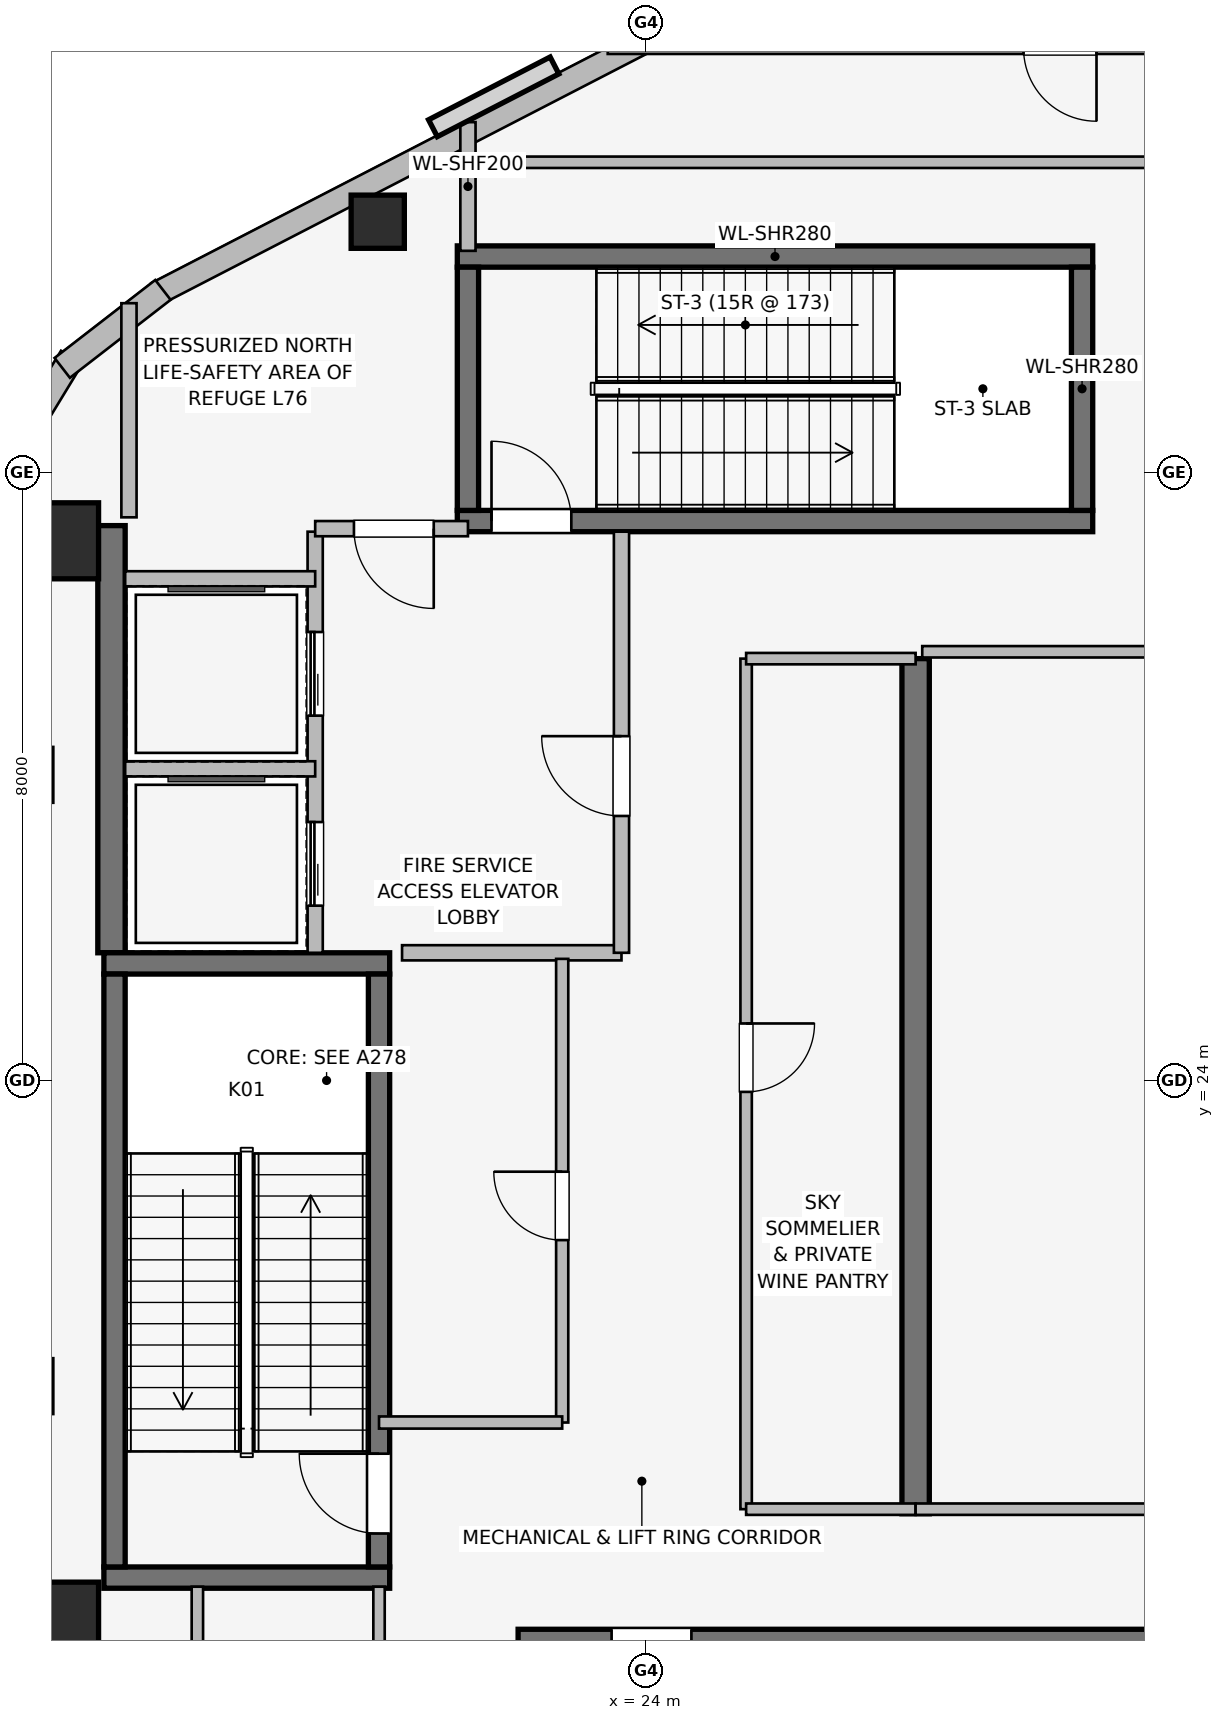
"""IFC4 building model, lengths in metres.
Left out: names, types, materials, properties, quantities, classifications, styles, units other than length and angle.
Written with IfcOpenShell. Run it as: python <this file> out.ifc"""

import sys

from ifc_helpers import new_model, si_unit, direction, frame, frame_2d, origin, origin_2d, place, context, subcontext, project, spatial, rectangle, extrude, element, fill, save


model = new_model("IFC4")
c1 = context("Model", 3, precision=1e-05, world=origin(), true_north=direction((0.0, 1.0)))
c2 = subcontext(c1, "Body", "Model", "MODEL_VIEW")
j1 = project(units=[si_unit("LENGTHUNIT", "METRE"), si_unit("PLANEANGLEUNIT", "RADIAN")], contexts=[c1])
p1 = place(None, origin())
s1 = spatial("IfcSite", under=j1, at=p1, CompositionType="ELEMENT")
p2 = place(p1, origin())
s2 = spatial("IfcBuilding", under=s1, at=p2, CompositionType="ELEMENT")
p3 = place(p2, frame((0.0, 0.0, 279.9)))
s3 = spatial("IfcBuildingStorey", under=s2, at=p3, CompositionType="ELEMENT", Elevation=279.9)
p4 = place(p3, frame((16.97, 25.68, 0.0), z_axis=(0.0, 0.0, 1.0), x_axis=(0.0, 1.0, 0.0)))
e1 = element("IfcWall", 1, at=p4, inside=s3, PredefinedType="SHEAR", context=c2, shape_type="SweptSolid", body=[
    extrude(rectangle(XDim=5.62, YDim=0.36, at=frame_2d((2.81, 0.0))), origin(), (0.0, 0.0, 1.0), 5.2),
])
p5 = place(p3, frame((27.55, 29.55, 0.0), z_axis=(0.0, 0.0, 1.0), x_axis=(0.0, -1.0, 0.0)))
e2 = element("IfcWall", 2, at=p5, inside=s3, PredefinedType="SHEAR", context=c2, shape_type="SweptSolid", body=[
    extrude(rectangle(XDim=11.25, YDim=0.36, at=frame_2d((5.625, 0.0))), origin(), (0.0, 0.0, 1.0), 5.2),
])
for number, where, z_axis, x_axis in (
    (3, (16.87, 17.46, 0.0), (0.0, 0.0, 1.0), (1.0, 0.0, 0.0)),
    (4, (20.63, 25.54, 0.0), (0.0, 0.0, 1.0), (-1.0, 0.0, 0.0)),
):
    element("IfcWall", number, at=place(p3, frame(where, z_axis=z_axis, x_axis=x_axis)), inside=s3, PredefinedType="SHEAR", context=c2, shape_type="SweptSolid", body=[
        extrude(rectangle(XDim=3.76, YDim=0.28, at=frame_2d((1.88, 0.0))), origin(), (0.0, 0.0, 1.0), 5.2),
    ])
p6 = place(p3, frame((17.01, 25.4, 0.0), z_axis=(0.0, 0.0, 1.0), x_axis=(0.0, -1.0, 0.0)))
e5 = element("IfcWall", 5, at=p6, inside=s3, PredefinedType="SHEAR", context=c2, shape_type="SweptSolid", body=[
    extrude(rectangle(XDim=7.8, YDim=0.28, at=frame_2d((3.9, 0.0))), origin(), (0.0, 0.0, 1.0), 5.2),
])
p7 = place(p3, frame((20.49, 17.6, 0.0), z_axis=(0.0, 0.0, 1.0), x_axis=(0.0, 1.0, 0.0)))
e6 = element("IfcWall", 6, at=p7, inside=s3, PredefinedType="SHEAR", context=c2, shape_type="SweptSolid", body=[
    extrude(rectangle(XDim=7.8, YDim=0.28, at=frame_2d((3.9, 0.0))), origin(), (0.0, 0.0, 1.0), 5.2),
])
p8 = place(p7, frame((0.44, 0.0, 0.0)))
e7 = element("IfcOpeningElement", 7, at=p8, cuts=e6, PredefinedType="OPENING", context=c2, shape_type="SweptSolid", body=[
    extrude(rectangle(XDim=1.05, YDim=2.0, at=frame_2d((0.525, 1.0))), frame((0.0, 0.15, 0.0), z_axis=(0.0, -1.0, 0.0), x_axis=(1.0, 0.0, 0.0)), (0.0, 0.0, 1.0), 0.3),
])
p9 = place(p3, frame((30.68, 16.64, 0.0), z_axis=(0.0, 0.0, 1.0), x_axis=(-1.0, 0.0, 0.0)))
e8 = element("IfcWall", 8, at=p9, inside=s3, PredefinedType="SHEAR", context=c2, shape_type="SweptSolid", body=[
    extrude(rectangle(XDim=8.36, YDim=0.28, at=frame_2d((4.18, 0.0))), origin(), (0.0, 0.0, 1.0), 5.2),
])
p10 = place(p9, frame((6.08, 0.0, 0.0)))
e9 = element("IfcOpeningElement", 9, at=p10, cuts=e8, PredefinedType="OPENING", context=c2, shape_type="SweptSolid", body=[
    extrude(rectangle(XDim=1.05, YDim=2.0, at=frame_2d((0.525, 1.0))), frame((0.0, 0.15, 0.0), z_axis=(0.0, -1.0, 0.0), x_axis=(1.0, 0.0, 0.0)), (0.0, 0.0, 1.0), 0.3),
])
p11 = place(p3, frame((21.52, 31.36, 0.0), z_axis=(0.0, 0.0, 1.0), x_axis=(1.0, 0.0, 0.0)))
e10 = element("IfcWall", 10, at=p11, inside=s3, PredefinedType="SHEAR", context=c2, shape_type="SweptSolid", body=[
    extrude(rectangle(XDim=8.36, YDim=0.28, at=frame_2d((4.18, 0.0))), origin(), (0.0, 0.0, 1.0), 5.2),
])
p12 = place(p11, frame((0.45, 0.0, 0.0)))
e11 = element("IfcOpeningElement", 11, at=p12, cuts=e10, PredefinedType="OPENING", context=c2, shape_type="SweptSolid", body=[
    extrude(rectangle(XDim=1.05, YDim=2.0, at=frame_2d((0.525, 1.0))), frame((0.0, 0.15, 0.0), z_axis=(0.0, -1.0, 0.0), x_axis=(1.0, 0.0, 0.0)), (0.0, 0.0, 1.0), 0.3),
])
p13 = place(p3, frame((29.88, 34.84, 0.0), z_axis=(0.0, 0.0, 1.0), x_axis=(-1.0, 0.0, 0.0)))
e12 = element("IfcWall", 12, at=p13, inside=s3, PredefinedType="SHEAR", context=c2, shape_type="SweptSolid", body=[
    extrude(rectangle(XDim=8.36, YDim=0.28, at=frame_2d((4.18, 0.0))), origin(), (0.0, 0.0, 1.0), 5.2),
])
for number, where, z_axis, x_axis in (
    (13, (21.66, 34.7, 0.0), (0.0, 0.0, 1.0), (0.0, -1.0, 0.0)),
    (14, (29.74, 31.5, 0.0), (0.0, 0.0, 1.0), (0.0, 1.0, 0.0)),
):
    element("IfcWall", number, at=place(p3, frame(where, z_axis=z_axis, x_axis=x_axis)), inside=s3, PredefinedType="SHEAR", context=c2, shape_type="SweptSolid", body=[
        extrude(rectangle(XDim=3.2, YDim=0.28, at=frame_2d((1.6, 0.0))), origin(), (0.0, 0.0, 1.0), 5.2),
    ])
for number, where, z_axis, x_axis in (
    (15, (16.3, 16.9, 0.0), (0.0, 0.0, 1.0), (1.0, 0.0, 0.0)),
    (16, (16.3, 31.1, 0.0), (0.0, 0.0, 1.0), (1.0, 0.0, 0.0)),
):
    element("IfcColumn", number, at=place(p3, frame(where, z_axis=z_axis, x_axis=x_axis)), inside=s3, PredefinedType="COLUMN", context=c2, shape_type="SweptSolid", body=[
        extrude(rectangle(XDim=1.0, YDim=1.0, at=origin_2d()), origin(), (0.0, 0.0, 1.0), 5.2),
    ])
p14 = place(p3, frame((20.473, 35.298, 0.0), z_axis=(0.0, 0.0, 1.0), x_axis=(1.0, 0.0, 0.0)))
e17 = element("IfcColumn", 17, at=p14, inside=s3, PredefinedType="COLUMN", context=c2, shape_type="SweptSolid", body=[
    extrude(rectangle(XDim=0.7, YDim=0.7, at=origin_2d()), origin(), (0.0, 0.0, 1.0), 5.2),
])
p15 = place(p3, frame((17.566, 34.354, 0.0), z_axis=(0.0, 0.0, 1.0), x_axis=(0.888581481622, 0.458718814218, 0.0)))
e18 = element("IfcWall", 18, at=p15, inside=s3, PredefinedType="STANDARD", context=c2, shape_type="SweptSolid", body=[
    extrude(rectangle(XDim=15.077, YDim=0.31, at=frame_2d((7.539, 0.0))), origin(), (0.0, 0.0, 1.0), 4.89),
])
p16 = place(p3, frame((15.574, 32.082, 0.0), z_axis=(0.0, 0.0, 1.0), x_axis=(0.520325409202, 0.853968072318, 0.0)))
e19 = element("IfcWall", 19, at=p16, inside=s3, PredefinedType="STANDARD", context=c2, shape_type="SweptSolid", body=[
    extrude(rectangle(XDim=1.678, YDim=0.33, at=frame_2d((0.839, 0.0))), origin(), (0.0, 0.0, 1.0), 4.89),
])
p17 = place(p3, frame((16.322, 33.375, 0.0), z_axis=(0.0, 0.0, 1.0), x_axis=(0.790691856293, 0.61221433207, 0.0)))
e20 = element("IfcWall", 20, at=p17, inside=s3, PredefinedType="STANDARD", context=c2, shape_type="SweptSolid", body=[
    extrude(rectangle(XDim=1.676, YDim=0.33, at=frame_2d((0.838, 0.0))), origin(), (0.0, 0.0, 1.0), 4.89),
])
p18 = place(p3, frame((19.65, 25.68, 0.0), z_axis=(0.0, 0.0, 1.0), x_axis=(0.0, 1.0, 0.0)))
e21 = element("IfcWall", 21, at=p18, inside=s3, PredefinedType="PARTITIONING", context=c2, shape_type="SweptSolid", body=[
    extrude(rectangle(XDim=5.54, YDim=0.2, at=frame_2d((2.77, 0.0))), origin(), (0.0, 0.0, 1.0), 4.89),
])
p19 = place(p18, frame((0.62, 0.0, 0.0)))
e22 = element("IfcOpeningElement", 22, at=p19, cuts=e21, PredefinedType="OPENING", context=c2, shape_type="SweptSolid", body=[
    extrude(rectangle(XDim=1.1, YDim=2.2, at=frame_2d((0.55, 1.1))), frame((0.0, 0.11, 0.0), z_axis=(0.0, -1.0, 0.0), x_axis=(1.0, 0.0, 0.0)), (0.0, 0.0, 1.0), 0.22),
])
p20 = place(p18, frame((3.12, 0.0, 0.0)))
e23 = element("IfcOpeningElement", 23, at=p20, cuts=e21, PredefinedType="OPENING", context=c2, shape_type="SweptSolid", body=[
    extrude(rectangle(XDim=1.1, YDim=2.2, at=frame_2d((0.55, 1.1))), frame((0.0, 0.11, 0.0), z_axis=(0.0, -1.0, 0.0), x_axis=(1.0, 0.0, 0.0)), (0.0, 0.0, 1.0), 0.22),
])
p21 = place(p3, frame((20.793, 25.68, 0.0), z_axis=(0.0, 0.0, 1.0), x_axis=(1.0, 0.0, 0.0)))
e24 = element("IfcWall", 24, at=p21, inside=s3, PredefinedType="PARTITIONING", context=c2, shape_type="SweptSolid", body=[
    extrude(rectangle(XDim=2.887, YDim=0.2, at=frame_2d((1.443, 0.0))), origin(), (0.0, 0.0, 1.0), 4.89),
])
p22 = place(p3, frame((23.68, 25.68, 0.0), z_axis=(0.0, 0.0, 1.0), x_axis=(0.0, 1.0, 0.0)))
e25 = element("IfcWall", 25, at=p22, inside=s3, PredefinedType="PARTITIONING", context=c2, shape_type="SweptSolid", body=[
    extrude(rectangle(XDim=5.54, YDim=0.2, at=frame_2d((2.77, 0.0))), origin(), (0.0, 0.0, 1.0), 4.89),
])
p23 = place(p22, frame((1.8, 0.0, 0.0)))
e26 = element("IfcOpeningElement", 26, at=p23, cuts=e25, PredefinedType="OPENING", context=c2, shape_type="SweptSolid", body=[
    extrude(rectangle(XDim=1.05, YDim=2.0, at=frame_2d((0.525, 1.0))), frame((0.0, 0.11, 0.0), z_axis=(0.0, -1.0, 0.0), x_axis=(1.0, 0.0, 0.0)), (0.0, 0.0, 1.0), 0.22),
])
p24 = place(p3, frame((21.66, 31.26, 0.0), z_axis=(0.0, 0.0, 1.0), x_axis=(-1.0, 0.0, 0.0)))
e27 = element("IfcWall", 27, at=p24, inside=s3, PredefinedType="PARTITIONING", context=c2, shape_type="SweptSolid", body=[
    extrude(rectangle(XDim=2.01, YDim=0.2, at=frame_2d((1.005, 0.0))), origin(), (0.0, 0.0, 1.0), 4.89),
])
p25 = place(p24, frame((0.45, 0.0, 0.0)))
e28 = element("IfcOpeningElement", 28, at=p25, cuts=e27, PredefinedType="OPENING", context=c2, shape_type="SweptSolid", body=[
    extrude(rectangle(XDim=1.05, YDim=2.0, at=frame_2d((0.525, 1.0))), frame((0.0, 0.11, 0.0), z_axis=(0.0, -1.0, 0.0), x_axis=(1.0, 0.0, 0.0)), (0.0, 0.0, 1.0), 0.22),
])
p26 = place(p3, frame((17.15, 28.1, 0.0), z_axis=(0.0, 0.0, 1.0), x_axis=(1.0, 0.0, 0.0)))
e29 = element("IfcWall", 29, at=p26, inside=s3, PredefinedType="PARTITIONING", context=c2, shape_type="SweptSolid", body=[
    extrude(rectangle(XDim=2.5, YDim=0.2, at=frame_2d((1.25, 0.0))), origin(), (0.0, 0.0, 1.0), 4.89),
])
p27 = place(p3, frame((19.65, 30.6, 0.0), z_axis=(0.0, 0.0, 1.0), x_axis=(-1.0, 0.0, 0.0)))
e30 = element("IfcWall", 30, at=p27, inside=s3, PredefinedType="PARTITIONING", context=c2, shape_type="SweptSolid", body=[
    extrude(rectangle(XDim=2.5, YDim=0.2, at=frame_2d((1.25, 0.0))), origin(), (0.0, 0.0, 1.0), 3.79),
])
p28 = place(p3, frame((22.9, 19.5, 0.0), z_axis=(0.0, 0.0, 1.0), x_axis=(0.0, 1.0, 0.0)))
e31 = element("IfcWall", 31, at=p28, inside=s3, PredefinedType="PARTITIONING", context=c2, shape_type="SweptSolid", body=[
    extrude(rectangle(XDim=6.1, YDim=0.16, at=frame_2d((3.05, 0.0))), origin(), (0.0, 0.0, 1.0), 4.89),
])
p29 = place(p28, frame((2.4, 0.0, 0.0)))
e32 = element("IfcOpeningElement", 32, at=p29, cuts=e31, PredefinedType="OPENING", context=c2, shape_type="SweptSolid", body=[
    extrude(rectangle(XDim=0.9, YDim=2.0, at=frame_2d((0.45, 1.0))), frame((0.0, 0.09, 0.0), z_axis=(0.0, -1.0, 0.0), x_axis=(1.0, 0.0, 0.0)), (0.0, 0.0, 1.0), 0.18),
])
p30 = place(p3, frame((20.49, 19.5, 0.0), z_axis=(0.0, 0.0, 1.0), x_axis=(1.0, 0.0, 0.0)))
e33 = element("IfcWall", 33, at=p30, inside=s3, PredefinedType="PARTITIONING", context=c2, shape_type="SweptSolid", body=[
    extrude(rectangle(XDim=2.41, YDim=0.16, at=frame_2d((1.205, 0.0))), origin(), (0.0, 0.0, 1.0), 3.79),
])
p31 = place(p3, frame((25.32, 29.55, 0.0), z_axis=(0.0, 0.0, 1.0), x_axis=(0.0, -1.0, 0.0)))
e34 = element("IfcWall", 34, at=p31, inside=s3, PredefinedType="PARTITIONING", context=c2, shape_type="SweptSolid", body=[
    extrude(rectangle(XDim=11.19, YDim=0.15, at=frame_2d((5.595, 0.0))), origin(), (0.0, 0.0, 1.0), 4.89),
])
p32 = place(p31, frame((4.8, 0.0, 0.0)))
e35 = element("IfcOpeningElement", 35, at=p32, cuts=e34, PredefinedType="OPENING", context=c2, shape_type="SweptSolid", body=[
    extrude(rectangle(XDim=0.9, YDim=2.0, at=frame_2d((0.45, 1.0))), frame((0.0, 0.085, 0.0), z_axis=(0.0, -1.0, 0.0), x_axis=(1.0, 0.0, 0.0)), (0.0, 0.0, 1.0), 0.17),
])
p33 = place(p3, frame((25.32, 18.36, 0.0), z_axis=(0.0, 0.0, 1.0), x_axis=(1.0, 0.0, 0.0)))
e36 = element("IfcWall", 36, at=p33, inside=s3, PredefinedType="PARTITIONING", context=c2, shape_type="SweptSolid", body=[
    extrude(rectangle(XDim=2.23, YDim=0.15, at=frame_2d((1.115, 0.0))), origin(), (0.0, 0.0, 1.0), 4.89),
])
p34 = place(p3, frame((27.55, 29.55, 0.0), z_axis=(0.0, 0.0, 1.0), x_axis=(-1.0, 0.0, 0.0)))
e37 = element("IfcWall", 37, at=p34, inside=s3, PredefinedType="PARTITIONING", context=c2, shape_type="SweptSolid", body=[
    extrude(rectangle(XDim=2.23, YDim=0.15, at=frame_2d((1.115, 0.0))), origin(), (0.0, 0.0, 1.0), 3.79),
])
p35 = place(p3, frame((18.1, 17.34, 0.0), z_axis=(0.0, 0.0, 1.0), x_axis=(0.0, -1.0, 0.0)))
e38 = element("IfcWall", 38, at=p35, inside=s3, PredefinedType="PARTITIONING", context=c2, shape_type="SweptSolid", body=[
    extrude(rectangle(XDim=4.133, YDim=0.15, at=frame_2d((2.066, 0.0))), origin(), (0.0, 0.0, 1.0), 4.89),
])
p36 = place(p3, frame((20.49, 13.2, 0.0), z_axis=(0.0, 0.0, 1.0), x_axis=(0.0, 1.0, 0.0)))
e39 = element("IfcWall", 39, at=p36, inside=s3, PredefinedType="PARTITIONING", context=c2, shape_type="SweptSolid", body=[
    extrude(rectangle(XDim=4.14, YDim=0.15, at=frame_2d((2.07, 0.0))), origin(), (0.0, 0.0, 1.0), 4.89),
])
p37 = place(p36, frame((1.25, 0.0, 0.0)))
e40 = element("IfcOpeningElement", 40, at=p37, cuts=e39, PredefinedType="OPENING", context=c2, shape_type="SweptSolid", body=[
    extrude(rectangle(XDim=0.9, YDim=2.0, at=frame_2d((0.45, 1.0))), frame((0.0, 0.085, 0.0), z_axis=(0.0, -1.0, 0.0), x_axis=(1.0, 0.0, 0.0)), (0.0, 0.0, 1.0), 0.17),
])
p38 = place(p3, frame((17.2, 34.226, 0.0), z_axis=(0.0, 0.0, 1.0), x_axis=(0.0, -1.0, 0.0)))
e41 = element("IfcWall", 41, at=p38, inside=s3, PredefinedType="PARTITIONING", context=c2, shape_type="SweptSolid", body=[
    extrude(rectangle(XDim=2.817, YDim=0.2, at=frame_2d((1.409, 0.0))), origin(), (0.0, 0.0, 1.0), 4.89),
])
p39 = place(p3, frame((21.66, 34.915, 0.0), z_axis=(0.0, 0.0, 1.0), x_axis=(0.0, 1.0, 0.0)))
e42 = element("IfcWall", 42, at=p39, inside=s3, PredefinedType="PARTITIONING", context=c2, shape_type="SweptSolid", body=[
    extrude(rectangle(XDim=1.693, YDim=0.2, at=frame_2d((0.846, 0.0))), origin(), (0.0, 0.0, 1.0), 4.89),
])
p40 = place(p3, frame((27.55, 18.36, 0.0), z_axis=(0.0, 0.0, 1.0), x_axis=(1.0, 0.0, 0.0)))
e43 = element("IfcWall", 43, at=p40, inside=s3, PredefinedType="PARTITIONING", context=c2, shape_type="SweptSolid", body=[
    extrude(rectangle(XDim=12.29, YDim=0.15, at=frame_2d((6.145, 0.0))), origin(), (0.0, 0.0, 1.0), 4.031),
])
p41 = place(p40, frame((5.55, 0.0, 0.0)))
e44 = element("IfcOpeningElement", 44, at=p41, cuts=e43, PredefinedType="OPENING", context=c2, shape_type="SweptSolid", body=[
    extrude(rectangle(XDim=0.9, YDim=2.0, at=frame_2d((0.45, 1.0))), frame((0.0, 0.085, 0.0), z_axis=(0.0, -1.0, 0.0), x_axis=(1.0, 0.0, 0.0)), (0.0, 0.0, 1.0), 0.17),
])
p42 = place(p3, frame((39.84, 29.64, 0.0), z_axis=(0.0, 0.0, 1.0), x_axis=(-1.0, 0.0, 0.0)))
e45 = element("IfcWall", 45, at=p42, inside=s3, PredefinedType="PARTITIONING", context=c2, shape_type="SweptSolid", body=[
    extrude(rectangle(XDim=12.203, YDim=0.15, at=frame_2d((6.102, 0.0))), origin(), (0.0, 0.0, 1.0), 4.031),
])
p43 = place(p3, frame((34.0, 37.58, 0.0), z_axis=(0.0, 0.0, 1.0), x_axis=(-1.0, 0.0, 0.0)))
e46 = element("IfcWall", 46, at=p43, inside=s3, PredefinedType="PARTITIONING", context=c2, shape_type="SweptSolid", body=[
    extrude(rectangle(XDim=10.501, YDim=0.15, at=frame_2d((5.25, 0.0))), origin(), (0.0, 0.0, 1.0), 4.89),
])
p44 = place(p43, frame((4.07, 0.0, 0.0)))
e47 = element("IfcOpeningElement", 47, at=p44, cuts=e46, PredefinedType="OPENING", context=c2, shape_type="SweptSolid", body=[
    extrude(rectangle(XDim=0.96, YDim=2.0, at=frame_2d((0.48, 1.0))), frame((0.0, 0.085, 0.0), z_axis=(0.0, -1.0, 0.0), x_axis=(1.0, 0.0, 0.0)), (0.0, 0.0, 1.0), 0.17),
])
p45 = place(p3, frame((32.55, 36.08, 0.0), z_axis=(0.0, 0.0, 1.0), x_axis=(-1.0, 0.0, 0.0)))
e48 = element("IfcWall", 48, at=p45, inside=s3, PredefinedType="PARTITIONING", context=c2, shape_type="SweptSolid", body=[
    extrude(rectangle(XDim=10.15, YDim=0.15, at=frame_2d((5.075, 0.0))), origin(), (0.0, 0.0, 1.0), 4.89),
])
p46 = place(p8, origin())
e49 = element("IfcDoor", 49, at=p46, inside=s3, OperationType="SINGLE_SWING_RIGHT", PredefinedType="DOOR", context=c2, shape_type="SweptSolid", body=[
    extrude(rectangle(XDim=1.05, YDim=2.0, at=frame_2d((0.525, 1.0))), frame((0.0, 0.025, 0.0), z_axis=(0.0, -1.0, 0.0), x_axis=(1.0, 0.0, 0.0)), (0.0, 0.0, 1.0), 0.05),
])
fill(e7, e49)
p47 = place(p10, origin())
e50 = element("IfcDoor", 50, at=p47, inside=s3, OperationType="SINGLE_SWING_RIGHT", PredefinedType="DOOR", context=c2, shape_type="SweptSolid", body=[
    extrude(rectangle(XDim=1.05, YDim=2.0, at=frame_2d((0.525, 1.0))), frame((0.0, 0.025, 0.0), z_axis=(0.0, -1.0, 0.0), x_axis=(1.0, 0.0, 0.0)), (0.0, 0.0, 1.0), 0.05),
])
fill(e9, e50)
p48 = place(p12, origin())
e51 = element("IfcDoor", 51, at=p48, inside=s3, OperationType="SINGLE_SWING_LEFT", PredefinedType="DOOR", context=c2, shape_type="SweptSolid", body=[
    extrude(rectangle(XDim=1.05, YDim=2.0, at=frame_2d((0.525, 1.0))), frame((0.0, 0.025, 0.0), z_axis=(0.0, -1.0, 0.0), x_axis=(1.0, 0.0, 0.0)), (0.0, 0.0, 1.0), 0.05),
])
fill(e11, e51)
p49 = place(p19, origin())
e52 = element("IfcDoor", 52, at=p49, inside=s3, OperationType="SLIDING_TO_LEFT", PredefinedType="DOOR", context=c2, shape_type="SweptSolid", body=[
    extrude(rectangle(XDim=1.1, YDim=2.2, at=frame_2d((0.55, 1.1))), frame((0.0, 0.025, 0.0), z_axis=(0.0, -1.0, 0.0), x_axis=(1.0, 0.0, 0.0)), (0.0, 0.0, 1.0), 0.05),
])
fill(e22, e52)
p50 = place(p20, origin())
e53 = element("IfcDoor", 53, at=p50, inside=s3, OperationType="SLIDING_TO_LEFT", PredefinedType="DOOR", context=c2, shape_type="SweptSolid", body=[
    extrude(rectangle(XDim=1.1, YDim=2.2, at=frame_2d((0.55, 1.1))), frame((0.0, 0.025, 0.0), z_axis=(0.0, -1.0, 0.0), x_axis=(1.0, 0.0, 0.0)), (0.0, 0.0, 1.0), 0.05),
])
fill(e23, e53)
p51 = place(p23, origin())
e54 = element("IfcDoor", 54, at=p51, inside=s3, OperationType="SINGLE_SWING_RIGHT", PredefinedType="DOOR", context=c2, shape_type="SweptSolid", body=[
    extrude(rectangle(XDim=1.05, YDim=2.0, at=frame_2d((0.525, 1.0))), frame((0.0, 0.025, 0.0), z_axis=(0.0, -1.0, 0.0), x_axis=(1.0, 0.0, 0.0)), (0.0, 0.0, 1.0), 0.05),
])
fill(e26, e54)
p52 = place(p25, origin())
e55 = element("IfcDoor", 55, at=p52, inside=s3, OperationType="SINGLE_SWING_LEFT", PredefinedType="DOOR", context=c2, shape_type="SweptSolid", body=[
    extrude(rectangle(XDim=1.05, YDim=2.0, at=frame_2d((0.525, 1.0))), frame((0.0, 0.025, 0.0), z_axis=(0.0, -1.0, 0.0), x_axis=(1.0, 0.0, 0.0)), (0.0, 0.0, 1.0), 0.05),
])
fill(e28, e55)
p53 = place(p29, origin())
e56 = element("IfcDoor", 56, at=p53, inside=s3, OperationType="SINGLE_SWING_RIGHT", PredefinedType="DOOR", context=c2, shape_type="SweptSolid", body=[
    extrude(rectangle(XDim=0.9, YDim=2.0, at=frame_2d((0.45, 1.0))), frame((0.0, 0.025, 0.0), z_axis=(0.0, -1.0, 0.0), x_axis=(1.0, 0.0, 0.0)), (0.0, 0.0, 1.0), 0.05),
])
fill(e32, e56)
p54 = place(p32, origin())
e57 = element("IfcDoor", 57, at=p54, inside=s3, OperationType="SINGLE_SWING_LEFT", PredefinedType="DOOR", context=c2, shape_type="SweptSolid", body=[
    extrude(rectangle(XDim=0.9, YDim=2.0, at=frame_2d((0.45, 1.0))), frame((0.0, 0.025, 0.0), z_axis=(0.0, -1.0, 0.0), x_axis=(1.0, 0.0, 0.0)), (0.0, 0.0, 1.0), 0.05),
])
fill(e35, e57)
save(model, sys.argv[1])
